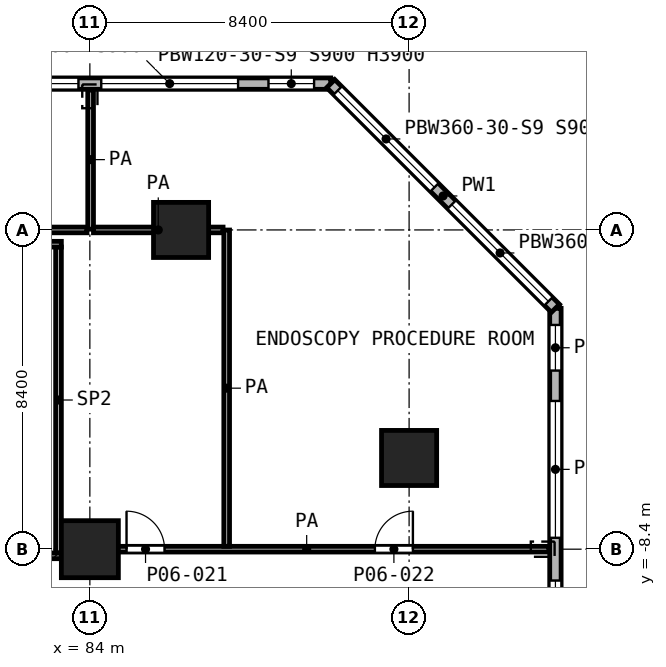
"""IFC4 building model, lengths in metres.
Left out: names, types, materials, properties, quantities, classifications, styles, units other than length and angle.
Written with IfcOpenShell. Run it as: python <this file> out.ifc"""

import sys

from ifc_helpers import new_model, si_unit, direction, frame, frame_2d, origin, origin_2d, place, context, subcontext, project, spatial, rectangle, extrude, element, fill, save


model = new_model("IFC4")
c1 = context("Model", 3, precision=1e-05, world=origin(), true_north=direction((0.0, 1.0)))
c2 = subcontext(c1, "Body", "Model", "MODEL_VIEW")
j1 = project(units=[si_unit("LENGTHUNIT", "METRE"), si_unit("PLANEANGLEUNIT", "RADIAN")], contexts=[c1])
p1 = place(None, origin())
s1 = spatial("IfcSite", under=j1, at=p1, CompositionType="ELEMENT")
p2 = place(p1, origin())
s2 = spatial("IfcBuilding", under=s1, at=p2, CompositionType="ELEMENT")
p3 = place(p2, frame((0.0, 0.0, 29.0)))
s3 = spatial("IfcBuildingStorey", under=s2, at=p3, CompositionType="ELEMENT", Elevation=29.0)
for number, where, z_axis, x_axis in (
    (1, (86.4, 0.0, 0.0), (0.0, 0.0, 1.0), (1.0, 0.0, 0.0)),
    (2, (92.4, -6.0, 0.0), (0.0, 0.0, 1.0), (1.0, 0.0, 0.0)),
):
    element("IfcColumn", number, at=place(p3, frame(where, z_axis=z_axis, x_axis=x_axis)), inside=s3, PredefinedType="COLUMN", context=c2, shape_type="SweptSolid", body=[
        extrude(rectangle(XDim=1.45, YDim=1.45, at=origin_2d()), origin(), (0.0, 0.0, 1.0), 5.2),
    ])
p4 = place(p3, frame((84.0, -8.4, 0.0), z_axis=(0.0, 0.0, 1.0), x_axis=(1.0, 0.0, 0.0)))
e3 = element("IfcColumn", 3, at=p4, inside=s3, PredefinedType="COLUMN", context=c2, shape_type="SweptSolid", body=[
    extrude(rectangle(XDim=1.5, YDim=1.5, at=origin_2d()), origin(), (0.0, 0.0, 1.0), 5.2),
])
p5 = place(p3, frame((96.25, -31.538, 0.0), z_axis=(0.0, 0.0, 1.0), x_axis=(0.0, 1.0, 0.0)))
e4 = element("IfcWall", 4, at=p5, inside=s3, PredefinedType="SOLIDWALL", context=c2, shape_type="SweptSolid", body=[
    extrude(rectangle(XDim=29.476, YDim=0.3, at=frame_2d((14.738, 0.0))), origin(), (0.0, 0.0, 1.0), 4.7),
])
p6 = place(p5, frame((0.438, 0.0, 0.9)))
e5 = element("IfcOpeningElement", 5, at=p6, cuts=e4, PredefinedType="OPENING", context=c2, shape_type="SweptSolid", body=[
    extrude(rectangle(XDim=1.2, YDim=3.0, at=frame_2d((0.6, 1.5))), frame((0.0, 0.16, 0.0), z_axis=(0.0, -1.0, 0.0), x_axis=(1.0, 0.0, 0.0)), (0.0, 0.0, 1.0), 0.32),
])
p7 = place(p5, frame((2.438, 0.0, 0.9)))
e6 = element("IfcOpeningElement", 6, at=p7, cuts=e4, PredefinedType="OPENING", context=c2, shape_type="SweptSolid", body=[
    extrude(rectangle(XDim=3.6, YDim=3.0, at=frame_2d((1.8, 1.5))), frame((0.0, 0.16, 0.0), z_axis=(0.0, -1.0, 0.0), x_axis=(1.0, 0.0, 0.0)), (0.0, 0.0, 1.0), 0.32),
])
p8 = place(p5, frame((7.163, 0.0, 0.9)))
e7 = element("IfcOpeningElement", 7, at=p8, cuts=e4, PredefinedType="OPENING", context=c2, shape_type="SweptSolid", body=[
    extrude(rectangle(XDim=1.2, YDim=3.0, at=frame_2d((0.6, 1.5))), frame((0.0, 0.16, 0.0), z_axis=(0.0, -1.0, 0.0), x_axis=(1.0, 0.0, 0.0)), (0.0, 0.0, 1.0), 0.32),
])
p9 = place(p5, frame((10.838, 0.0, 0.9)))
e8 = element("IfcOpeningElement", 8, at=p9, cuts=e4, PredefinedType="OPENING", context=c2, shape_type="SweptSolid", body=[
    extrude(rectangle(XDim=3.6, YDim=3.0, at=frame_2d((1.8, 1.5))), frame((0.0, 0.16, 0.0), z_axis=(0.0, -1.0, 0.0), x_axis=(1.0, 0.0, 0.0)), (0.0, 0.0, 1.0), 0.32),
])
p10 = place(p5, frame((15.038, 0.0, 0.9)))
e9 = element("IfcOpeningElement", 9, at=p10, cuts=e4, PredefinedType="OPENING", context=c2, shape_type="SweptSolid", body=[
    extrude(rectangle(XDim=3.6, YDim=3.0, at=frame_2d((1.8, 1.5))), frame((0.0, 0.16, 0.0), z_axis=(0.0, -1.0, 0.0), x_axis=(1.0, 0.0, 0.0)), (0.0, 0.0, 1.0), 0.32),
])
p11 = place(p5, frame((21.113, 0.0, 0.9)))
e10 = element("IfcOpeningElement", 10, at=p11, cuts=e4, PredefinedType="OPENING", context=c2, shape_type="SweptSolid", body=[
    extrude(rectangle(XDim=1.2, YDim=3.0, at=frame_2d((0.6, 1.5))), frame((0.0, 0.16, 0.0), z_axis=(0.0, -1.0, 0.0), x_axis=(1.0, 0.0, 0.0)), (0.0, 0.0, 1.0), 0.32),
])
p12 = place(p5, frame((23.438, 0.0, 0.9)))
e11 = element("IfcOpeningElement", 11, at=p12, cuts=e4, PredefinedType="OPENING", context=c2, shape_type="SweptSolid", body=[
    extrude(rectangle(XDim=3.6, YDim=3.0, at=frame_2d((1.8, 1.5))), frame((0.0, 0.16, 0.0), z_axis=(0.0, -1.0, 0.0), x_axis=(1.0, 0.0, 0.0)), (0.0, 0.0, 1.0), 0.32),
])
p13 = place(p5, frame((27.838, 0.0, 0.9)))
e12 = element("IfcOpeningElement", 12, at=p13, cuts=e4, PredefinedType="OPENING", context=c2, shape_type="SweptSolid", body=[
    extrude(rectangle(XDim=1.2, YDim=3.0, at=frame_2d((0.6, 1.5))), frame((0.0, 0.16, 0.0), z_axis=(0.0, -1.0, 0.0), x_axis=(1.0, 0.0, 0.0)), (0.0, 0.0, 1.0), 0.32),
])
p14 = place(p3, frame((96.25, -2.062, 0.0), z_axis=(0.0, 0.0, 1.0), x_axis=(-0.707106781187, 0.707106781187, 0.0)))
e13 = element("IfcWall", 13, at=p14, inside=s3, PredefinedType="SOLIDWALL", context=c2, shape_type="SweptSolid", body=[
    extrude(rectangle(XDim=8.361, YDim=0.3, at=frame_2d((4.181, 0.0))), origin(), (0.0, 0.0, 1.0), 4.7),
])
p15 = place(p14, frame((0.259, 0.0, 0.9)))
e14 = element("IfcOpeningElement", 14, at=p15, cuts=e13, PredefinedType="OPENING", context=c2, shape_type="SweptSolid", body=[
    extrude(rectangle(XDim=3.6, YDim=3.0, at=frame_2d((1.8, 1.5))), frame((0.0, 0.16, 0.0), z_axis=(0.0, -1.0, 0.0), x_axis=(1.0, 0.0, 0.0)), (0.0, 0.0, 1.0), 0.32),
])
p16 = place(p14, frame((4.502, 0.0, 0.9)))
e15 = element("IfcOpeningElement", 15, at=p16, cuts=e13, PredefinedType="OPENING", context=c2, shape_type="SweptSolid", body=[
    extrude(rectangle(XDim=3.6, YDim=3.0, at=frame_2d((1.8, 1.5))), frame((0.0, 0.16, 0.0), z_axis=(0.0, -1.0, 0.0), x_axis=(1.0, 0.0, 0.0)), (0.0, 0.0, 1.0), 0.32),
])
p17 = place(p3, frame((90.338, 3.85, 0.0), z_axis=(0.0, 0.0, 1.0), x_axis=(-1.0, 0.0, 0.0)))
e16 = element("IfcWall", 16, at=p17, inside=s3, PredefinedType="SOLIDWALL", context=c2, shape_type="SweptSolid", body=[
    extrude(rectangle(XDim=88.276, YDim=0.3, at=frame_2d((44.138, 0.0))), origin(), (0.0, 0.0, 1.0), 4.7),
])
p18 = place(p17, frame((0.438, 0.0, 0.9)))
e17 = element("IfcOpeningElement", 17, at=p18, cuts=e16, PredefinedType="OPENING", context=c2, shape_type="SweptSolid", body=[
    extrude(rectangle(XDim=1.2, YDim=3.0, at=frame_2d((0.6, 1.5))), frame((0.0, 0.16, 0.0), z_axis=(0.0, -1.0, 0.0), x_axis=(1.0, 0.0, 0.0)), (0.0, 0.0, 1.0), 0.32),
])
p19 = place(p17, frame((2.438, 0.0, 0.9)))
e18 = element("IfcOpeningElement", 18, at=p19, cuts=e16, PredefinedType="OPENING", context=c2, shape_type="SweptSolid", body=[
    extrude(rectangle(XDim=3.6, YDim=3.0, at=frame_2d((1.8, 1.5))), frame((0.0, 0.16, 0.0), z_axis=(0.0, -1.0, 0.0), x_axis=(1.0, 0.0, 0.0)), (0.0, 0.0, 1.0), 0.32),
])
p20 = place(p17, frame((6.638, 0.0, 0.9)))
e19 = element("IfcOpeningElement", 19, at=p20, cuts=e16, PredefinedType="OPENING", context=c2, shape_type="SweptSolid", body=[
    extrude(rectangle(XDim=3.6, YDim=3.0, at=frame_2d((1.8, 1.5))), frame((0.0, 0.16, 0.0), z_axis=(0.0, -1.0, 0.0), x_axis=(1.0, 0.0, 0.0)), (0.0, 0.0, 1.0), 0.32),
])
p21 = place(p17, frame((10.838, 0.0, 0.9)))
e20 = element("IfcOpeningElement", 20, at=p21, cuts=e16, PredefinedType="OPENING", context=c2, shape_type="SweptSolid", body=[
    extrude(rectangle(XDim=3.6, YDim=3.0, at=frame_2d((1.8, 1.5))), frame((0.0, 0.16, 0.0), z_axis=(0.0, -1.0, 0.0), x_axis=(1.0, 0.0, 0.0)), (0.0, 0.0, 1.0), 0.32),
])
p22 = place(p17, frame((15.038, 0.0, 0.9)))
e21 = element("IfcOpeningElement", 21, at=p22, cuts=e16, PredefinedType="OPENING", context=c2, shape_type="SweptSolid", body=[
    extrude(rectangle(XDim=3.6, YDim=3.0, at=frame_2d((1.8, 1.5))), frame((0.0, 0.16, 0.0), z_axis=(0.0, -1.0, 0.0), x_axis=(1.0, 0.0, 0.0)), (0.0, 0.0, 1.0), 0.32),
])
p23 = place(p17, frame((19.923, 0.0, 0.9)))
e22 = element("IfcOpeningElement", 22, at=p23, cuts=e16, PredefinedType="OPENING", context=c2, shape_type="SweptSolid", body=[
    extrude(rectangle(XDim=2.4, YDim=3.0, at=frame_2d((1.2, 1.5))), frame((0.0, 0.16, 0.0), z_axis=(0.0, -1.0, 0.0), x_axis=(1.0, 0.0, 0.0)), (0.0, 0.0, 1.0), 0.32),
])
p24 = place(p17, frame((23.438, 0.0, 0.9)))
e23 = element("IfcOpeningElement", 23, at=p24, cuts=e16, PredefinedType="OPENING", context=c2, shape_type="SweptSolid", body=[
    extrude(rectangle(XDim=3.6, YDim=3.0, at=frame_2d((1.8, 1.5))), frame((0.0, 0.16, 0.0), z_axis=(0.0, -1.0, 0.0), x_axis=(1.0, 0.0, 0.0)), (0.0, 0.0, 1.0), 0.32),
])
p25 = place(p17, frame((27.638, 0.0, 0.9)))
e24 = element("IfcOpeningElement", 24, at=p25, cuts=e16, PredefinedType="OPENING", context=c2, shape_type="SweptSolid", body=[
    extrude(rectangle(XDim=3.6, YDim=3.0, at=frame_2d((1.8, 1.5))), frame((0.0, 0.16, 0.0), z_axis=(0.0, -1.0, 0.0), x_axis=(1.0, 0.0, 0.0)), (0.0, 0.0, 1.0), 0.32),
])
p26 = place(p17, frame((31.838, 0.0, 0.9)))
e25 = element("IfcOpeningElement", 25, at=p26, cuts=e16, PredefinedType="OPENING", context=c2, shape_type="SweptSolid", body=[
    extrude(rectangle(XDim=3.6, YDim=3.0, at=frame_2d((1.8, 1.5))), frame((0.0, 0.16, 0.0), z_axis=(0.0, -1.0, 0.0), x_axis=(1.0, 0.0, 0.0)), (0.0, 0.0, 1.0), 0.32),
])
p27 = place(p17, frame((36.038, 0.0, 0.9)))
e26 = element("IfcOpeningElement", 26, at=p27, cuts=e16, PredefinedType="OPENING", context=c2, shape_type="SweptSolid", body=[
    extrude(rectangle(XDim=3.6, YDim=3.0, at=frame_2d((1.8, 1.5))), frame((0.0, 0.16, 0.0), z_axis=(0.0, -1.0, 0.0), x_axis=(1.0, 0.0, 0.0)), (0.0, 0.0, 1.0), 0.32),
])
p28 = place(p17, frame((40.238, 0.0, 0.9)))
e27 = element("IfcOpeningElement", 27, at=p28, cuts=e16, PredefinedType="OPENING", context=c2, shape_type="SweptSolid", body=[
    extrude(rectangle(XDim=3.6, YDim=3.0, at=frame_2d((1.8, 1.5))), frame((0.0, 0.16, 0.0), z_axis=(0.0, -1.0, 0.0), x_axis=(1.0, 0.0, 0.0)), (0.0, 0.0, 1.0), 0.32),
])
p29 = place(p17, frame((44.773, 0.0, 0.9)))
e28 = element("IfcOpeningElement", 28, at=p29, cuts=e16, PredefinedType="OPENING", context=c2, shape_type="SweptSolid", body=[
    extrude(rectangle(XDim=2.4, YDim=3.0, at=frame_2d((1.2, 1.5))), frame((0.0, 0.16, 0.0), z_axis=(0.0, -1.0, 0.0), x_axis=(1.0, 0.0, 0.0)), (0.0, 0.0, 1.0), 0.32),
])
p30 = place(p17, frame((49.173, 0.0, 0.9)))
e29 = element("IfcOpeningElement", 29, at=p30, cuts=e16, PredefinedType="OPENING", context=c2, shape_type="SweptSolid", body=[
    extrude(rectangle(XDim=2.4, YDim=3.0, at=frame_2d((1.2, 1.5))), frame((0.0, 0.16, 0.0), z_axis=(0.0, -1.0, 0.0), x_axis=(1.0, 0.0, 0.0)), (0.0, 0.0, 1.0), 0.32),
])
p31 = place(p17, frame((52.838, 0.0, 0.9)))
e30 = element("IfcOpeningElement", 30, at=p31, cuts=e16, PredefinedType="OPENING", context=c2, shape_type="SweptSolid", body=[
    extrude(rectangle(XDim=3.6, YDim=3.0, at=frame_2d((1.8, 1.5))), frame((0.0, 0.16, 0.0), z_axis=(0.0, -1.0, 0.0), x_axis=(1.0, 0.0, 0.0)), (0.0, 0.0, 1.0), 0.32),
])
p32 = place(p17, frame((57.038, 0.0, 0.9)))
e31 = element("IfcOpeningElement", 31, at=p32, cuts=e16, PredefinedType="OPENING", context=c2, shape_type="SweptSolid", body=[
    extrude(rectangle(XDim=3.6, YDim=3.0, at=frame_2d((1.8, 1.5))), frame((0.0, 0.16, 0.0), z_axis=(0.0, -1.0, 0.0), x_axis=(1.0, 0.0, 0.0)), (0.0, 0.0, 1.0), 0.32),
])
p33 = place(p17, frame((61.923, 0.0, 0.9)))
e32 = element("IfcOpeningElement", 32, at=p33, cuts=e16, PredefinedType="OPENING", context=c2, shape_type="SweptSolid", body=[
    extrude(rectangle(XDim=2.4, YDim=3.0, at=frame_2d((1.2, 1.5))), frame((0.0, 0.16, 0.0), z_axis=(0.0, -1.0, 0.0), x_axis=(1.0, 0.0, 0.0)), (0.0, 0.0, 1.0), 0.32),
])
p34 = place(p17, frame((65.438, 0.0, 0.9)))
e33 = element("IfcOpeningElement", 33, at=p34, cuts=e16, PredefinedType="OPENING", context=c2, shape_type="SweptSolid", body=[
    extrude(rectangle(XDim=3.6, YDim=3.0, at=frame_2d((1.8, 1.5))), frame((0.0, 0.16, 0.0), z_axis=(0.0, -1.0, 0.0), x_axis=(1.0, 0.0, 0.0)), (0.0, 0.0, 1.0), 0.32),
])
p35 = place(p17, frame((69.638, 0.0, 0.9)))
e34 = element("IfcOpeningElement", 34, at=p35, cuts=e16, PredefinedType="OPENING", context=c2, shape_type="SweptSolid", body=[
    extrude(rectangle(XDim=3.6, YDim=3.0, at=frame_2d((1.8, 1.5))), frame((0.0, 0.16, 0.0), z_axis=(0.0, -1.0, 0.0), x_axis=(1.0, 0.0, 0.0)), (0.0, 0.0, 1.0), 0.32),
])
p36 = place(p17, frame((73.838, 0.0, 0.9)))
e35 = element("IfcOpeningElement", 35, at=p36, cuts=e16, PredefinedType="OPENING", context=c2, shape_type="SweptSolid", body=[
    extrude(rectangle(XDim=3.6, YDim=3.0, at=frame_2d((1.8, 1.5))), frame((0.0, 0.16, 0.0), z_axis=(0.0, -1.0, 0.0), x_axis=(1.0, 0.0, 0.0)), (0.0, 0.0, 1.0), 0.32),
])
p37 = place(p17, frame((78.038, 0.0, 0.9)))
e36 = element("IfcOpeningElement", 36, at=p37, cuts=e16, PredefinedType="OPENING", context=c2, shape_type="SweptSolid", body=[
    extrude(rectangle(XDim=3.6, YDim=3.0, at=frame_2d((1.8, 1.5))), frame((0.0, 0.16, 0.0), z_axis=(0.0, -1.0, 0.0), x_axis=(1.0, 0.0, 0.0)), (0.0, 0.0, 1.0), 0.32),
])
p38 = place(p17, frame((82.238, 0.0, 0.9)))
e37 = element("IfcOpeningElement", 37, at=p38, cuts=e16, PredefinedType="OPENING", context=c2, shape_type="SweptSolid", body=[
    extrude(rectangle(XDim=3.6, YDim=3.0, at=frame_2d((1.8, 1.5))), frame((0.0, 0.16, 0.0), z_axis=(0.0, -1.0, 0.0), x_axis=(1.0, 0.0, 0.0)), (0.0, 0.0, 1.0), 0.32),
])
p39 = place(p17, frame((86.638, 0.0, 0.9)))
e38 = element("IfcOpeningElement", 38, at=p39, cuts=e16, PredefinedType="OPENING", context=c2, shape_type="SweptSolid", body=[
    extrude(rectangle(XDim=1.2, YDim=3.0, at=frame_2d((0.6, 1.5))), frame((0.0, 0.16, 0.0), z_axis=(0.0, -1.0, 0.0), x_axis=(1.0, 0.0, 0.0)), (0.0, 0.0, 1.0), 0.32),
])
p40 = place(p3, frame((80.45, -0.375, 0.0), z_axis=(0.0, 0.0, 1.0), x_axis=(1.0, 0.0, 0.0)))
e39 = element("IfcWall", 39, at=p40, inside=s3, PredefinedType="PARTITIONING", context=c2, shape_type="SweptSolid", body=[
    extrude(rectangle(XDim=2.8, YDim=0.15, at=frame_2d((1.4, 0.0))), origin(), (0.0, 0.0, 1.0), 4.7),
])
p41 = place(p3, frame((80.45, -8.575, 0.0), z_axis=(0.0, 0.0, 1.0), x_axis=(1.0, 0.0, 0.0)))
e40 = element("IfcWall", 40, at=p41, inside=s3, PredefinedType="SHEAR", context=c2, shape_type="SweptSolid", body=[
    extrude(rectangle(XDim=2.8, YDim=0.15, at=frame_2d((1.4, 0.0))), origin(), (0.0, 0.0, 1.0), 4.7),
])
p42 = place(p41, frame((0.8, 0.0, 0.0)))
e41 = element("IfcOpeningElement", 41, at=p42, cuts=e40, PredefinedType="OPENING", context=c2, shape_type="SweptSolid", body=[
    extrude(rectangle(XDim=1.1, YDim=2.1, at=frame_2d((0.55, 1.05))), frame((0.0, 0.085, 0.0), z_axis=(0.0, -1.0, 0.0), x_axis=(1.0, 0.0, 0.0)), (0.0, 0.0, 1.0), 0.17),
])
p43 = place(p3, frame((83.175, -8.5, 0.0), z_axis=(0.0, 0.0, 1.0), x_axis=(0.0, 1.0, 0.0)))
e42 = element("IfcWall", 42, at=p43, inside=s3, PredefinedType="PARTITIONING", context=c2, shape_type="SweptSolid", body=[
    extrude(rectangle(XDim=8.05, YDim=0.15, at=frame_2d((4.025, 0.0))), origin(), (0.0, 0.0, 1.0), 4.7),
])
p44 = place(p3, frame((83.33, -8.4, 0.0), z_axis=(0.0, 0.0, 1.0), x_axis=(1.0, 0.0, 0.0)))
e43 = element("IfcWall", 43, at=p44, inside=s3, PredefinedType="PARTITIONING", context=c2, shape_type="SweptSolid", body=[
    extrude(rectangle(XDim=12.75, YDim=0.15, at=frame_2d((6.375, 0.0))), origin(), (0.0, 0.0, 1.0), 4.7),
])
p45 = place(p44, frame((1.635, 0.0, 0.0)))
e44 = element("IfcOpeningElement", 44, at=p45, cuts=e43, PredefinedType="OPENING", context=c2, shape_type="SweptSolid", body=[
    extrude(rectangle(XDim=1.0, YDim=2.1, at=frame_2d((0.5, 1.05))), frame((0.0, 0.085, 0.0), z_axis=(0.0, -1.0, 0.0), x_axis=(1.0, 0.0, 0.0)), (0.0, 0.0, 1.0), 0.17),
])
p46 = place(p44, frame((8.17, 0.0, 0.0)))
e45 = element("IfcOpeningElement", 45, at=p46, cuts=e43, PredefinedType="OPENING", context=c2, shape_type="SweptSolid", body=[
    extrude(rectangle(XDim=1.0, YDim=2.1, at=frame_2d((0.5, 1.05))), frame((0.0, 0.085, 0.0), z_axis=(0.0, -1.0, 0.0), x_axis=(1.0, 0.0, 0.0)), (0.0, 0.0, 1.0), 0.17),
])
p47 = place(p3, frame((80.178, 0.0, 0.0), z_axis=(0.0, 0.0, 1.0), x_axis=(1.0, 0.0, 0.0)))
e46 = element("IfcWall", 46, at=p47, inside=s3, PredefinedType="PARTITIONING", context=c2, shape_type="SweptSolid", body=[
    extrude(rectangle(XDim=3.747, YDim=0.15, at=frame_2d((1.874, 0.0))), origin(), (0.0, 0.0, 1.0), 4.7),
])
p48 = place(p3, frame((84.095, 0.0, 0.0), z_axis=(0.0, 0.0, 1.0), x_axis=(1.0, 0.0, 0.0)))
e47 = element("IfcWall", 47, at=p48, inside=s3, PredefinedType="PARTITIONING", context=c2, shape_type="SweptSolid", body=[
    extrude(rectangle(XDim=3.41, YDim=0.15, at=frame_2d((1.705, 0.0))), origin(), (0.0, 0.0, 1.0), 4.7),
])
p49 = place(p3, frame((84.02, 0.02, 0.0), z_axis=(0.0, 0.0, 1.0), x_axis=(0.0, 1.0, 0.0)))
e48 = element("IfcWall", 48, at=p49, inside=s3, PredefinedType="PARTITIONING", context=c2, shape_type="SweptSolid", body=[
    extrude(rectangle(XDim=3.66, YDim=0.15, at=frame_2d((1.83, 0.0))), origin(), (0.0, 0.0, 1.0), 4.7),
])
p50 = place(p3, frame((87.6, -8.325, 0.0), z_axis=(0.0, 0.0, 1.0), x_axis=(0.0, 1.0, 0.0)))
e49 = element("IfcWall", 49, at=p50, inside=s3, PredefinedType="PARTITIONING", context=c2, shape_type="SweptSolid", body=[
    extrude(rectangle(XDim=8.323, YDim=0.15, at=frame_2d((4.162, 0.0))), origin(), (0.0, 0.0, 1.0), 4.7),
])
p51 = place(p11, origin())
e50 = element("IfcWindow", 50, at=p51, inside=s3, PartitioningType="SINGLE_PANEL", PredefinedType="WINDOW", context=c2, shape_type="SweptSolid", body=[
    extrude(rectangle(XDim=1.2, YDim=3.0, at=frame_2d((0.6, 1.5))), frame((0.0, 0.03, 0.0), z_axis=(0.0, -1.0, 0.0), x_axis=(1.0, 0.0, 0.0)), (0.0, 0.0, 1.0), 0.06),
])
fill(e10, e50)
p52 = place(p12, origin())
e51 = element("IfcWindow", 51, at=p52, inside=s3, PartitioningType="SINGLE_PANEL", PredefinedType="WINDOW", context=c2, shape_type="SweptSolid", body=[
    extrude(rectangle(XDim=3.6, YDim=3.0, at=frame_2d((1.8, 1.5))), frame((0.0, 0.03, 0.0), z_axis=(0.0, -1.0, 0.0), x_axis=(1.0, 0.0, 0.0)), (0.0, 0.0, 1.0), 0.06),
])
fill(e11, e51)
p53 = place(p13, origin())
e52 = element("IfcWindow", 52, at=p53, inside=s3, PartitioningType="SINGLE_PANEL", PredefinedType="WINDOW", context=c2, shape_type="SweptSolid", body=[
    extrude(rectangle(XDim=1.2, YDim=3.0, at=frame_2d((0.6, 1.5))), frame((0.0, 0.03, 0.0), z_axis=(0.0, -1.0, 0.0), x_axis=(1.0, 0.0, 0.0)), (0.0, 0.0, 1.0), 0.06),
])
fill(e12, e52)
p54 = place(p15, origin())
e53 = element("IfcWindow", 53, at=p54, inside=s3, PartitioningType="SINGLE_PANEL", PredefinedType="WINDOW", context=c2, shape_type="SweptSolid", body=[
    extrude(rectangle(XDim=3.6, YDim=3.0, at=frame_2d((1.8, 1.5))), frame((0.0, 0.03, 0.0), z_axis=(0.0, -1.0, 0.0), x_axis=(1.0, 0.0, 0.0)), (0.0, 0.0, 1.0), 0.06),
])
fill(e14, e53)
p55 = place(p16, origin())
e54 = element("IfcWindow", 54, at=p55, inside=s3, PartitioningType="SINGLE_PANEL", PredefinedType="WINDOW", context=c2, shape_type="SweptSolid", body=[
    extrude(rectangle(XDim=3.6, YDim=3.0, at=frame_2d((1.8, 1.5))), frame((0.0, 0.03, 0.0), z_axis=(0.0, -1.0, 0.0), x_axis=(1.0, 0.0, 0.0)), (0.0, 0.0, 1.0), 0.06),
])
fill(e15, e54)
p56 = place(p18, origin())
e55 = element("IfcWindow", 55, at=p56, inside=s3, PartitioningType="SINGLE_PANEL", PredefinedType="WINDOW", context=c2, shape_type="SweptSolid", body=[
    extrude(rectangle(XDim=1.2, YDim=3.0, at=frame_2d((0.6, 1.5))), frame((0.0, 0.03, 0.0), z_axis=(0.0, -1.0, 0.0), x_axis=(1.0, 0.0, 0.0)), (0.0, 0.0, 1.0), 0.06),
])
fill(e17, e55)
p57 = place(p19, origin())
e56 = element("IfcWindow", 56, at=p57, inside=s3, PartitioningType="SINGLE_PANEL", PredefinedType="WINDOW", context=c2, shape_type="SweptSolid", body=[
    extrude(rectangle(XDim=3.6, YDim=3.0, at=frame_2d((1.8, 1.5))), frame((0.0, 0.03, 0.0), z_axis=(0.0, -1.0, 0.0), x_axis=(1.0, 0.0, 0.0)), (0.0, 0.0, 1.0), 0.06),
])
fill(e18, e56)
p58 = place(p20, origin())
e57 = element("IfcWindow", 57, at=p58, inside=s3, PartitioningType="SINGLE_PANEL", PredefinedType="WINDOW", context=c2, shape_type="SweptSolid", body=[
    extrude(rectangle(XDim=3.6, YDim=3.0, at=frame_2d((1.8, 1.5))), frame((0.0, 0.03, 0.0), z_axis=(0.0, -1.0, 0.0), x_axis=(1.0, 0.0, 0.0)), (0.0, 0.0, 1.0), 0.06),
])
fill(e19, e57)
p59 = place(p45, origin())
e58 = element("IfcDoor", 58, at=p59, inside=s3, OperationType="SINGLE_SWING_LEFT", PredefinedType="DOOR", context=c2, shape_type="SweptSolid", body=[
    extrude(rectangle(XDim=1.0, YDim=2.1, at=frame_2d((0.5, 1.05))), frame((0.0, 0.025, 0.0), z_axis=(0.0, -1.0, 0.0), x_axis=(1.0, 0.0, 0.0)), (0.0, 0.0, 1.0), 0.05),
])
fill(e44, e58)
p60 = place(p46, origin())
e59 = element("IfcDoor", 59, at=p60, inside=s3, OperationType="SINGLE_SWING_RIGHT", PredefinedType="DOOR", context=c2, shape_type="SweptSolid", body=[
    extrude(rectangle(XDim=1.0, YDim=2.1, at=frame_2d((0.5, 1.05))), frame((0.0, 0.025, 0.0), z_axis=(0.0, -1.0, 0.0), x_axis=(1.0, 0.0, 0.0)), (0.0, 0.0, 1.0), 0.05),
])
fill(e45, e59)
save(model, sys.argv[1])
